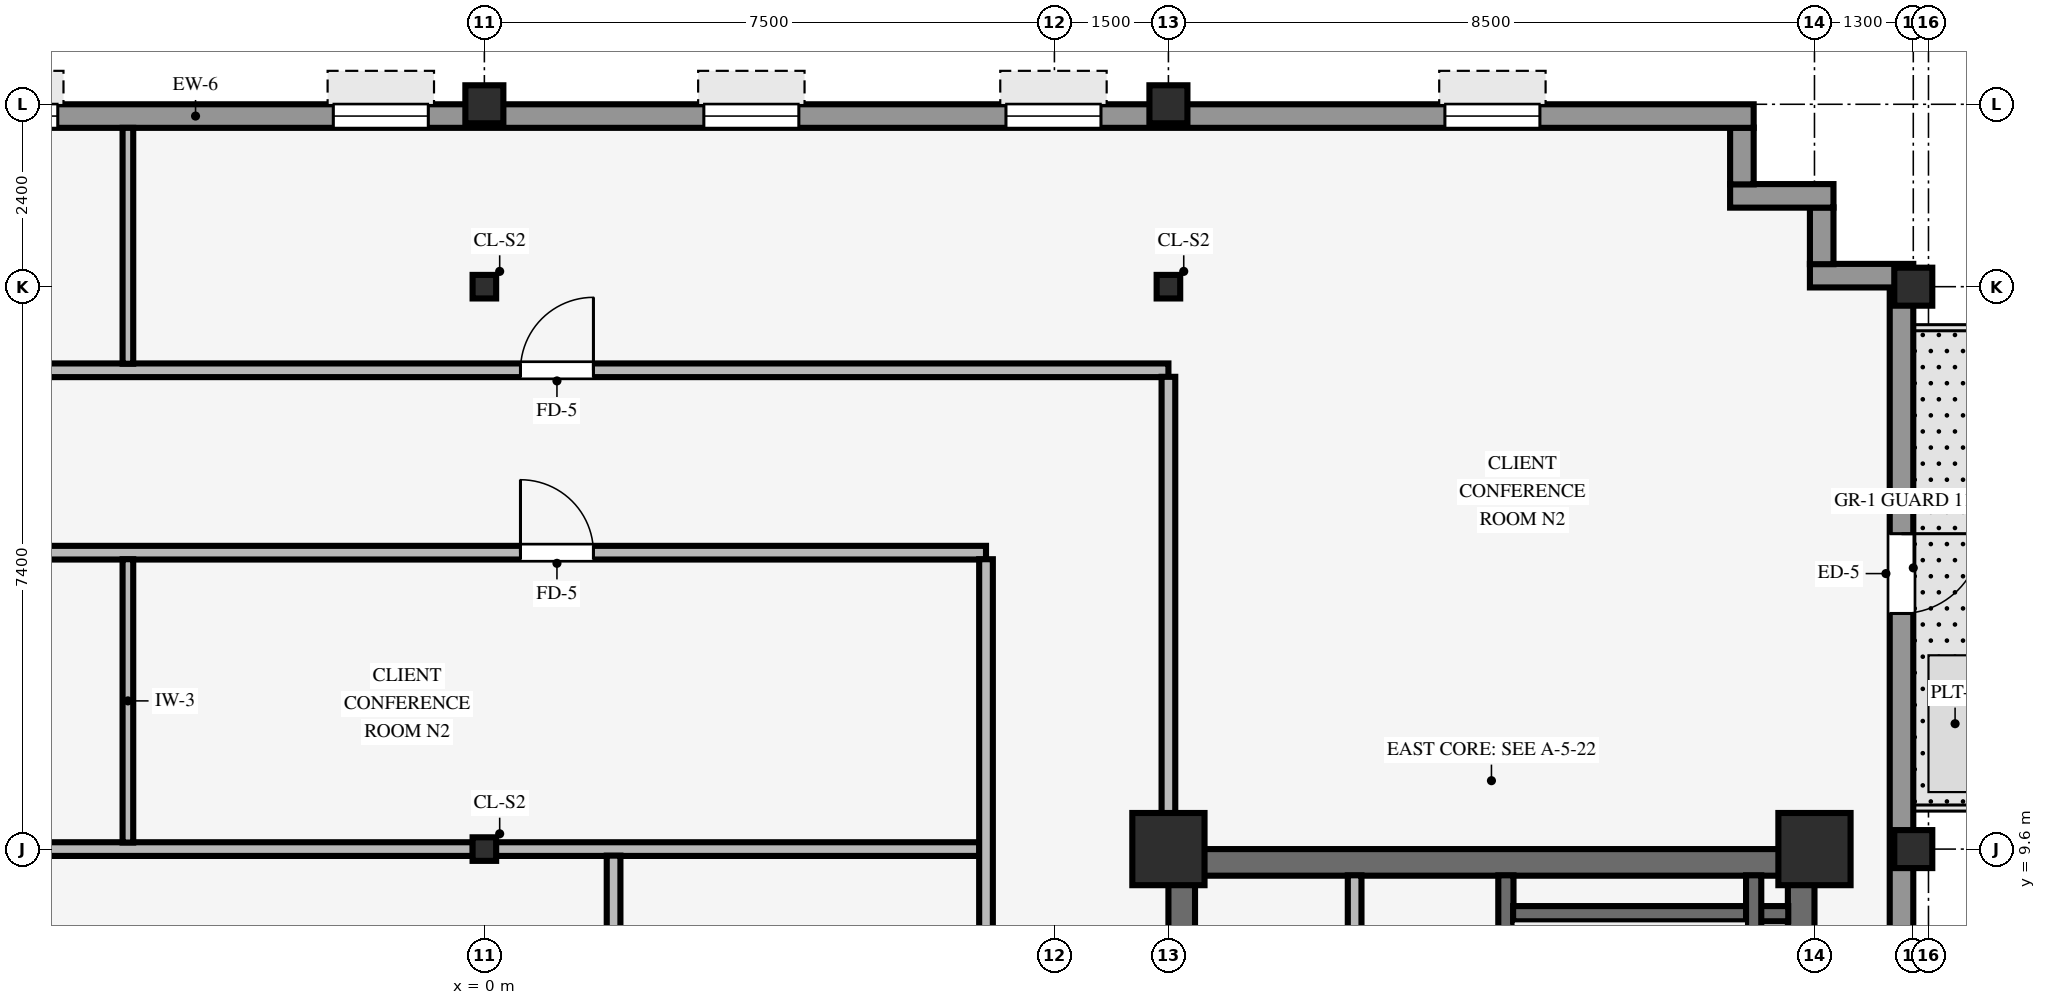
"""IFC4 building model, lengths in metres.
Left out: names, types, materials, properties, quantities, classifications, styles, units other than length and angle.
Written with IfcOpenShell. Run it as: python <this file> out.ifc"""

import sys

from ifc_helpers import new_model, si_unit, direction, frame, frame_2d, origin, origin_2d, place, context, subcontext, project, spatial, rectangle, hollow_rectangle, i_section, extrude, source, transform, mapped, element, fill, save


model = new_model("IFC4")
c1 = context("Model", 3, precision=1e-05, world=origin(), true_north=direction((0.0, 1.0)))
c2 = subcontext(c1, "Body", "Model", "MODEL_VIEW")
j1 = project(units=[si_unit("LENGTHUNIT", "METRE"), si_unit("PLANEANGLEUNIT", "RADIAN")], contexts=[c1])
p1 = place(None, origin())
s1 = spatial("IfcSite", under=j1, at=p1, CompositionType="ELEMENT")
p2 = place(p1, origin())
s2 = spatial("IfcBuilding", under=s1, at=p2, CompositionType="ELEMENT")
p3 = place(p2, frame((0.0, 0.0, 220.1)))
s3 = spatial("IfcBuildingStorey", under=s2, at=p3, CompositionType="ELEMENT", Elevation=220.1)
p4 = place(p3, frame((9.0, 9.425, 0.0), z_axis=(0.0, 0.0, 1.0), x_axis=(1.0, 0.0, 0.0)))
e1 = element("IfcWall", 1, at=p4, inside=s3, PredefinedType="SHEAR", context=c2, shape_type="SweptSolid", body=[
    extrude(rectangle(XDim=8.5, YDim=0.35, at=frame_2d((4.25, 0.0))), origin(), (0.0, 0.0, 1.0), 3.37),
])
p5 = place(p3, frame((9.175, -9.255, 0.0), z_axis=(0.0, 0.0, 1.0), x_axis=(0.0, 1.0, 0.0)))
e2 = element("IfcWall", 2, at=p5, inside=s3, PredefinedType="SHEAR", context=c2, shape_type="SweptSolid", body=[
    extrude(rectangle(XDim=18.51, YDim=0.35, at=frame_2d((9.255, 0.0))), origin(), (0.0, 0.0, 1.0), 3.37),
])
p6 = place(p5, frame((8.655, 0.0, 0.0)))
e3 = element("IfcOpeningElement", 3, at=p6, cuts=e2, PredefinedType="OPENING", context=c2, shape_type="SweptSolid", body=[
    extrude(rectangle(XDim=1.2, YDim=2.15, at=frame_2d((0.6, 1.075))), frame((0.0, 0.185, 0.0), z_axis=(0.0, -1.0, 0.0), x_axis=(1.0, 0.0, 0.0)), (0.0, 0.0, 1.0), 0.37),
])
p7 = place(p3, frame((17.325, -9.255, 0.0), z_axis=(0.0, 0.0, 1.0), x_axis=(0.0, 1.0, 0.0)))
e4 = element("IfcWall", 4, at=p7, inside=s3, PredefinedType="SHEAR", context=c2, shape_type="SweptSolid", body=[
    extrude(rectangle(XDim=18.51, YDim=0.35, at=frame_2d((9.255, 0.0))), origin(), (0.0, 0.0, 1.0), 3.37),
])
for number, where, z_axis, x_axis in (
    (5, (9.0, 9.6, 0.0), (0.0, 0.0, 1.0), (1.0, 0.0, 0.0)),
    (6, (17.5, 9.6, 0.0), (0.0, 0.0, 1.0), (1.0, 0.0, 0.0)),
):
    element("IfcColumn", number, at=place(p3, frame(where, z_axis=z_axis, x_axis=x_axis)), inside=s3, PredefinedType="COLUMN", context=c2, shape_type="SweptSolid", body=[
        extrude(rectangle(XDim=0.95, YDim=0.95, at=origin_2d()), origin(), (0.0, 0.0, 1.0), 3.37),
    ])
for number, where, z_axis, x_axis in (
    (7, (18.8, 9.6, 0.0), (0.0, 0.0, 1.0), (1.0, 0.0, 0.0)),
    (8, (18.8, 17.0, 0.0), (0.0, 0.0, 1.0), (1.0, 0.0, 0.0)),
    (9, (0.0, 19.4, 0.0), (0.0, 0.0, 1.0), (1.0, 0.0, 0.0)),
    (10, (9.0, 19.4, 0.0), (0.0, 0.0, 1.0), (1.0, 0.0, 0.0)),
):
    element("IfcColumn", number, at=place(p3, frame(where, z_axis=z_axis, x_axis=x_axis)), inside=s3, PredefinedType="COLUMN", context=c2, shape_type="SweptSolid", body=[
        extrude(hollow_rectangle(XDim=0.5, YDim=0.5, WallThickness=0.032, InnerFilletRadius=0.032, OuterFilletRadius=0.064, at=origin_2d()), origin(), (0.0, 0.0, 1.0), 3.37),
    ])
for number, where, z_axis, x_axis in (
    (11, (0.0, 9.6, 0.0), (0.0, 0.0, 1.0), (1.0, 0.0, 0.0)),
    (12, (0.0, 17.0, 0.0), (0.0, 0.0, 1.0), (1.0, 0.0, 0.0)),
    (13, (9.0, 17.0, 0.0), (0.0, 0.0, 1.0), (1.0, 0.0, 0.0)),
):
    element("IfcColumn", number, at=place(p3, frame(where, z_axis=z_axis, x_axis=x_axis)), inside=s3, PredefinedType="COLUMN", context=c2, shape_type="SweptSolid", body=[
        extrude(i_section(OverallWidth=0.31, OverallDepth=0.31, WebThickness=0.015, FlangeThickness=0.015, FilletRadius=0.015, at=origin_2d()), origin(), (0.0, 0.0, 1.0), 3.37),
    ])
p8 = place(p3, frame((18.645, -16.994, 0.0), z_axis=(0.0, 0.0, 1.0), x_axis=(0.0, 1.0, 0.0)))
e14 = element("IfcWall", 14, at=p8, inside=s3, PredefinedType="STANDARD", context=c2, shape_type="SweptSolid", body=[
    extrude(rectangle(XDim=33.988, YDim=0.31, at=frame_2d((16.994, 0.0))), origin(), (0.0, 0.0, 1.0), 2.705),
])
p9 = place(p8, frame((30.744, 0.0, 0.0), z_axis=(0.0, 0.0, 1.0), x_axis=(-1.0, 0.0, 0.0)))
e15 = element("IfcOpeningElement", 15, at=p9, cuts=e14, PredefinedType="OPENING", context=c2, shape_type="SweptSolid", body=[
    extrude(rectangle(XDim=1.05, YDim=2.1, at=frame_2d((0.525, 1.05))), frame((0.0, 0.165, 0.0), z_axis=(0.0, -1.0, 0.0), x_axis=(1.0, 0.0, 0.0)), (0.0, 0.0, 1.0), 0.33),
])
p10 = place(p8, frame((2.26, 0.0, 0.8)))
e16 = element("IfcOpeningElement", 16, at=p10, cuts=e14, PredefinedType="OPENING", context=c2, shape_type="SweptSolid", body=[
    extrude(rectangle(XDim=2.05, YDim=1.52, at=frame_2d((1.025, 0.76))), frame((0.0, 0.165, 0.0), z_axis=(0.0, -1.0, 0.0), x_axis=(1.0, 0.0, 0.0)), (0.0, 0.0, 1.0), 0.33),
])
p11 = place(p3, frame((17.44, 17.145, 0.0), z_axis=(0.0, 0.0, 1.0), x_axis=(1.0, 0.0, 0.0)))
e17 = element("IfcWall", 17, at=p11, inside=s3, PredefinedType="STANDARD", context=c2, shape_type="SweptSolid", body=[
    extrude(rectangle(XDim=1.36, YDim=0.31, at=frame_2d((0.68, 0.0))), origin(), (0.0, 0.0, 1.0), 2.816),
])
p12 = place(p3, frame((17.595, 17.296, 0.0), z_axis=(0.0, 0.0, 1.0), x_axis=(0.0, 1.0, 0.0)))
e18 = element("IfcWall", 18, at=p12, inside=s3, PredefinedType="STANDARD", context=c2, shape_type="SweptSolid", body=[
    extrude(rectangle(XDim=0.748, YDim=0.31, at=frame_2d((0.374, 0.0))), origin(), (0.0, 0.0, 1.0), 2.816),
])
p13 = place(p3, frame((16.39, 18.195, 0.0), z_axis=(0.0, 0.0, 1.0), x_axis=(1.0, 0.0, 0.0)))
e19 = element("IfcWall", 19, at=p13, inside=s3, PredefinedType="STANDARD", context=c2, shape_type="SweptSolid", body=[
    extrude(rectangle(XDim=1.36, YDim=0.31, at=frame_2d((0.68, 0.0))), origin(), (0.0, 0.0, 1.0), 2.816),
])
p14 = place(p3, frame((16.545, 18.346, 0.0), z_axis=(0.0, 0.0, 1.0), x_axis=(0.0, 1.0, 0.0)))
e20 = element("IfcWall", 20, at=p14, inside=s3, PredefinedType="STANDARD", context=c2, shape_type="SweptSolid", body=[
    extrude(rectangle(XDim=0.748, YDim=0.31, at=frame_2d((0.374, 0.0))), origin(), (0.0, 0.0, 1.0), 2.816),
])
p15 = place(p3, frame((-24.3, 19.245, 0.0), z_axis=(0.0, 0.0, 1.0), x_axis=(1.0, 0.0, 0.0)))
e21 = element("IfcWall", 21, at=p15, inside=s3, PredefinedType="STANDARD", context=c2, shape_type="SweptSolid", body=[
    extrude(rectangle(XDim=41.0, YDim=0.31, at=frame_2d((20.5, 0.0))), origin(), (0.0, 0.0, 1.0), 2.705),
])
p16 = place(p15, frame((2.812, 0.0, 0.8)))
e22 = element("IfcOpeningElement", 22, at=p16, cuts=e21, PredefinedType="OPENING", context=c2, shape_type="SweptSolid", body=[
    extrude(rectangle(XDim=1.25, YDim=1.52, at=frame_2d((0.625, 0.76))), frame((0.0, 0.165, 0.0), z_axis=(0.0, -1.0, 0.0), x_axis=(1.0, 0.0, 0.0)), (0.0, 0.0, 1.0), 0.33),
])
p17 = place(p15, frame((7.688, 0.0, 0.8)))
e23 = element("IfcOpeningElement", 23, at=p17, cuts=e21, PredefinedType="OPENING", context=c2, shape_type="SweptSolid", body=[
    extrude(rectangle(XDim=1.25, YDim=1.52, at=frame_2d((0.625, 0.76))), frame((0.0, 0.165, 0.0), z_axis=(0.0, -1.0, 0.0), x_axis=(1.0, 0.0, 0.0)), (0.0, 0.0, 1.0), 0.33),
])
p18 = place(p15, frame((12.562, 0.0, 0.8)))
e24 = element("IfcOpeningElement", 24, at=p18, cuts=e21, PredefinedType="OPENING", context=c2, shape_type="SweptSolid", body=[
    extrude(rectangle(XDim=1.25, YDim=1.52, at=frame_2d((0.625, 0.76))), frame((0.0, 0.165, 0.0), z_axis=(0.0, -1.0, 0.0), x_axis=(1.0, 0.0, 0.0)), (0.0, 0.0, 1.0), 0.33),
])
p19 = place(p15, frame((17.438, 0.0, 0.8)))
e25 = element("IfcOpeningElement", 25, at=p19, cuts=e21, PredefinedType="OPENING", context=c2, shape_type="SweptSolid", body=[
    extrude(rectangle(XDim=1.25, YDim=1.52, at=frame_2d((0.625, 0.76))), frame((0.0, 0.165, 0.0), z_axis=(0.0, -1.0, 0.0), x_axis=(1.0, 0.0, 0.0)), (0.0, 0.0, 1.0), 0.33),
])
p20 = place(p15, frame((22.312, 0.0, 0.8)))
e26 = element("IfcOpeningElement", 26, at=p20, cuts=e21, PredefinedType="OPENING", context=c2, shape_type="SweptSolid", body=[
    extrude(rectangle(XDim=1.25, YDim=1.52, at=frame_2d((0.625, 0.76))), frame((0.0, 0.165, 0.0), z_axis=(0.0, -1.0, 0.0), x_axis=(1.0, 0.0, 0.0)), (0.0, 0.0, 1.0), 0.33),
])
p21 = place(p15, frame((27.188, 0.0, 0.8)))
e27 = element("IfcOpeningElement", 27, at=p21, cuts=e21, PredefinedType="OPENING", context=c2, shape_type="SweptSolid", body=[
    extrude(rectangle(XDim=1.25, YDim=1.52, at=frame_2d((0.625, 0.76))), frame((0.0, 0.165, 0.0), z_axis=(0.0, -1.0, 0.0), x_axis=(1.0, 0.0, 0.0)), (0.0, 0.0, 1.0), 0.33),
])
p22 = place(p15, frame((31.163, 0.0, 0.8)))
e28 = element("IfcOpeningElement", 28, at=p22, cuts=e21, PredefinedType="OPENING", context=c2, shape_type="SweptSolid", body=[
    extrude(rectangle(XDim=1.25, YDim=1.52, at=frame_2d((0.625, 0.76))), frame((0.0, 0.165, 0.0), z_axis=(0.0, -1.0, 0.0), x_axis=(1.0, 0.0, 0.0)), (0.0, 0.0, 1.0), 0.33),
])
p23 = place(p15, frame((36.938, 0.0, 0.8)))
e29 = element("IfcOpeningElement", 29, at=p23, cuts=e21, PredefinedType="OPENING", context=c2, shape_type="SweptSolid", body=[
    extrude(rectangle(XDim=1.25, YDim=1.52, at=frame_2d((0.625, 0.76))), frame((0.0, 0.165, 0.0), z_axis=(0.0, -1.0, 0.0), x_axis=(1.0, 0.0, 0.0)), (0.0, 0.0, 1.0), 0.33),
])
p24 = place(p3, frame((13.44, 0.9, 0.0), z_axis=(0.0, 0.0, 1.0), x_axis=(0.0, 1.0, 0.0)))
e30 = element("IfcWall", 30, at=p24, inside=s3, PredefinedType="SHEAR", context=c2, shape_type="SweptSolid", body=[
    extrude(rectangle(XDim=8.355, YDim=0.2, at=frame_2d((4.177, 0.0))), origin(), (0.0, 0.0, 1.0), 3.37),
])
p25 = place(p24, frame((0.43, 0.0, 0.0)))
e31 = element("IfcOpeningElement", 31, at=p25, cuts=e30, PredefinedType="OPENING", context=c2, shape_type="SweptSolid", body=[
    extrude(rectangle(XDim=1.1, YDim=2.15, at=frame_2d((0.55, 1.075))), frame((0.0, 0.11, 0.0), z_axis=(0.0, -1.0, 0.0), x_axis=(1.0, 0.0, 0.0)), (0.0, 0.0, 1.0), 0.22),
])
p26 = place(p3, frame((13.535, 8.75, 0.0), z_axis=(0.0, 0.0, 1.0), x_axis=(1.0, 0.0, 0.0)))
e32 = element("IfcWall", 32, at=p26, inside=s3, PredefinedType="SHEAR", context=c2, shape_type="SweptSolid", body=[
    extrude(rectangle(XDim=3.62, YDim=0.2, at=frame_2d((1.81, 0.0))), origin(), (0.0, 0.0, 1.0), 3.37),
])
p27 = place(p3, frame((16.7, 1.095, 0.0), z_axis=(0.0, 0.0, 1.0), x_axis=(0.0, 1.0, 0.0)))
e33 = element("IfcWall", 33, at=p27, inside=s3, PredefinedType="SHEAR", context=c2, shape_type="SweptSolid", body=[
    extrude(rectangle(XDim=8.16, YDim=0.2, at=frame_2d((4.08, 0.0))), origin(), (0.0, 0.0, 1.0), 3.37),
])
p28 = place(p3, frame((11.45, 1.49, 0.0), z_axis=(0.0, 0.0, 1.0), x_axis=(0.0, 1.0, 0.0)))
e34 = element("IfcWall", 34, at=p28, inside=s3, PredefinedType="PARTITIONING", context=c2, shape_type="SweptSolid", body=[
    extrude(rectangle(XDim=7.765, YDim=0.18, at=frame_2d((3.882, 0.0))), origin(), (0.0, 0.0, 1.0), 3.36),
])
p29 = place(p3, frame((-8.529, 9.6, 0.0), z_axis=(0.0, 0.0, 1.0), x_axis=(1.0, 0.0, 0.0)))
e35 = element("IfcWall", 35, at=p29, inside=s3, PredefinedType="PARTITIONING", context=c2, shape_type="SweptSolid", body=[
    extrude(rectangle(XDim=8.378, YDim=0.18, at=frame_2d((4.189, 0.0))), origin(), (0.0, 0.0, 1.0), 2.405),
])
p30 = place(p3, frame((0.151, 9.6, 0.0), z_axis=(0.0, 0.0, 1.0), x_axis=(1.0, 0.0, 0.0)))
e36 = element("IfcWall", 36, at=p30, inside=s3, PredefinedType="PARTITIONING", context=c2, shape_type="SweptSolid", body=[
    extrude(rectangle(XDim=6.363, YDim=0.18, at=frame_2d((3.182, 0.0))), origin(), (0.0, 0.0, 1.0), 2.405),
])
p31 = place(p3, frame((-17.7, 13.5, 0.0), z_axis=(0.0, 0.0, 1.0), x_axis=(1.0, 0.0, 0.0)))
e37 = element("IfcWall", 37, at=p31, inside=s3, PredefinedType="PARTITIONING", context=c2, shape_type="SweptSolid", body=[
    extrude(rectangle(XDim=24.3, YDim=0.18, at=frame_2d((12.15, 0.0))), origin(), (0.0, 0.0, 1.0), 3.008),
])
p32 = place(p31, frame((6.025, 0.0, 0.0)))
e38 = element("IfcOpeningElement", 38, at=p32, cuts=e37, PredefinedType="OPENING", context=c2, shape_type="SweptSolid", body=[
    extrude(rectangle(XDim=0.96, YDim=2.1, at=frame_2d((0.48, 1.05))), frame((0.0, 0.1, 0.0), z_axis=(0.0, -1.0, 0.0), x_axis=(1.0, 0.0, 0.0)), (0.0, 0.0, 1.0), 0.2),
])
p33 = place(p31, frame((18.175, 0.0, 0.0)))
e39 = element("IfcOpeningElement", 39, at=p33, cuts=e37, PredefinedType="OPENING", context=c2, shape_type="SweptSolid", body=[
    extrude(rectangle(XDim=0.96, YDim=2.1, at=frame_2d((0.48, 1.05))), frame((0.0, 0.1, 0.0), z_axis=(0.0, -1.0, 0.0), x_axis=(1.0, 0.0, 0.0)), (0.0, 0.0, 1.0), 0.2),
])
p34 = place(p3, frame((-26.09, 15.9, 0.0), z_axis=(0.0, 0.0, 1.0), x_axis=(1.0, 0.0, 0.0)))
e40 = element("IfcWall", 40, at=p34, inside=s3, PredefinedType="PARTITIONING", context=c2, shape_type="SweptSolid", body=[
    extrude(rectangle(XDim=35.09, YDim=0.18, at=frame_2d((17.545, 0.0))), origin(), (0.0, 0.0, 1.0), 3.36),
])
p35 = place(p34, frame((14.415, 0.0, 0.0)))
e41 = element("IfcOpeningElement", 41, at=p35, cuts=e40, PredefinedType="OPENING", context=c2, shape_type="SweptSolid", body=[
    extrude(rectangle(XDim=0.96, YDim=2.1, at=frame_2d((0.48, 1.05))), frame((0.0, 0.1, 0.0), z_axis=(0.0, -1.0, 0.0), x_axis=(1.0, 0.0, 0.0)), (0.0, 0.0, 1.0), 0.2),
])
p36 = place(p34, frame((26.565, 0.0, 0.0)))
e42 = element("IfcOpeningElement", 42, at=p36, cuts=e40, PredefinedType="OPENING", context=c2, shape_type="SweptSolid", body=[
    extrude(rectangle(XDim=0.96, YDim=2.1, at=frame_2d((0.48, 1.05))), frame((0.0, 0.1, 0.0), z_axis=(0.0, -1.0, 0.0), x_axis=(1.0, 0.0, 0.0)), (0.0, 0.0, 1.0), 0.2),
])
p37 = place(p3, frame((-4.69, 9.686, 0.0), z_axis=(0.0, 0.0, 1.0), x_axis=(0.0, 1.0, 0.0)))
e43 = element("IfcWall", 43, at=p37, inside=s3, PredefinedType="PARTITIONING", context=c2, shape_type="SweptSolid", body=[
    extrude(rectangle(XDim=3.728, YDim=0.14, at=frame_2d((1.864, 0.0))), origin(), (0.0, 0.0, 1.0), 3.36),
])
p38 = place(p3, frame((-4.69, 15.986, 0.0), z_axis=(0.0, 0.0, 1.0), x_axis=(0.0, 1.0, 0.0)))
e44 = element("IfcWall", 44, at=p38, inside=s3, PredefinedType="PARTITIONING", context=c2, shape_type="SweptSolid", body=[
    extrude(rectangle(XDim=3.104, YDim=0.14, at=frame_2d((1.552, 0.0))), origin(), (0.0, 0.0, 1.0), 3.36),
])
p39 = place(p3, frame((1.7, 1.336, 0.0), z_axis=(0.0, 0.0, 1.0), x_axis=(0.0, 1.0, 0.0)))
e45 = element("IfcWall", 45, at=p39, inside=s3, PredefinedType="PARTITIONING", context=c2, shape_type="SweptSolid", body=[
    extrude(rectangle(XDim=8.178, YDim=0.18, at=frame_2d((4.089, 0.0))), origin(), (0.0, 0.0, 1.0), 3.36),
])
p40 = place(p3, frame((6.6, 1.336, 0.0), z_axis=(0.0, 0.0, 1.0), x_axis=(0.0, 1.0, 0.0)))
e46 = element("IfcWall", 46, at=p40, inside=s3, PredefinedType="PARTITIONING", context=c2, shape_type="SweptSolid", body=[
    extrude(rectangle(XDim=12.078, YDim=0.18, at=frame_2d((6.039, 0.0))), origin(), (0.0, 0.0, 1.0), 3.36),
])
p41 = place(p40, frame((3.652, 0.0, 0.0)))
e47 = element("IfcOpeningElement", 47, at=p41, cuts=e46, PredefinedType="OPENING", context=c2, shape_type="SweptSolid", body=[
    extrude(rectangle(XDim=0.96, YDim=2.1, at=frame_2d((0.48, 1.05))), frame((0.0, 0.1, 0.0), z_axis=(0.0, -1.0, 0.0), x_axis=(1.0, 0.0, 0.0)), (0.0, 0.0, 1.0), 0.2),
])
p42 = place(p3, frame((9.0, 10.071, 0.0), z_axis=(0.0, 0.0, 1.0), x_axis=(0.0, 1.0, 0.0)))
e48 = element("IfcWall", 48, at=p42, inside=s3, PredefinedType="PARTITIONING", context=c2, shape_type="SweptSolid", body=[
    extrude(rectangle(XDim=5.743, YDim=0.18, at=frame_2d((2.872, 0.0))), origin(), (0.0, 0.0, 1.0), 2.816),
])
m1 = source(origin(), c2, "Body", "SweptSolid", [
    extrude(rectangle(XDim=1.05, YDim=2.1, at=frame_2d((0.525, 1.05))), frame((0.0, 0.025, 0.0), z_axis=(0.0, -1.0, 0.0), x_axis=(1.0, 0.0, 0.0)), (0.0, 0.0, 1.0), 0.05),
])
p43 = place(p9, origin())
e49 = element("IfcDoor", 49, at=p43, inside=s3, OperationType="SINGLE_SWING_LEFT", PredefinedType="DOOR", context=c2, shape_type="MappedRepresentation", body=[
    mapped(m1, transform((0.0, 0.0, 0.0), scale=1.0)),
])
fill(e15, e49)
m2 = source(origin(), c2, "Body", "SweptSolid", [
    extrude(rectangle(XDim=1.25, YDim=1.52, at=frame_2d((0.625, 0.76))), frame((0.0, 0.03, 0.0), z_axis=(0.0, -1.0, 0.0), x_axis=(1.0, 0.0, 0.0)), (0.0, 0.0, 1.0), 0.06),
])
p44 = place(p19, origin())
e50 = element("IfcWindow", 50, at=p44, inside=s3, PartitioningType="SINGLE_PANEL", PredefinedType="WINDOW", context=c2, shape_type="MappedRepresentation", body=[
    mapped(m2, transform((0.0, 0.0, 0.0), scale=1.0)),
])
fill(e25, e50)
p45 = place(p20, origin())
e51 = element("IfcWindow", 51, at=p45, inside=s3, PartitioningType="SINGLE_PANEL", PredefinedType="WINDOW", context=c2, shape_type="MappedRepresentation", body=[
    mapped(m2, transform((0.0, 0.0, 0.0), scale=1.0)),
])
fill(e26, e51)
p46 = place(p21, origin())
e52 = element("IfcWindow", 52, at=p46, inside=s3, PartitioningType="SINGLE_PANEL", PredefinedType="WINDOW", context=c2, shape_type="MappedRepresentation", body=[
    mapped(m2, transform((0.0, 0.0, 0.0), scale=1.0)),
])
fill(e27, e52)
p47 = place(p22, origin())
e53 = element("IfcWindow", 53, at=p47, inside=s3, PartitioningType="SINGLE_PANEL", PredefinedType="WINDOW", context=c2, shape_type="MappedRepresentation", body=[
    mapped(m2, transform((0.0, 0.0, 0.0), scale=1.0)),
])
fill(e28, e53)
p48 = place(p23, origin())
e54 = element("IfcWindow", 54, at=p48, inside=s3, PartitioningType="SINGLE_PANEL", PredefinedType="WINDOW", context=c2, shape_type="MappedRepresentation", body=[
    mapped(m2, transform((0.0, 0.0, 0.0), scale=1.0)),
])
fill(e29, e54)
m3 = source(origin(), c2, "Body", "SweptSolid", [
    extrude(rectangle(XDim=0.96, YDim=2.1, at=frame_2d((0.48, 1.05))), frame((0.0, 0.025, 0.0), z_axis=(0.0, -1.0, 0.0), x_axis=(1.0, 0.0, 0.0)), (0.0, 0.0, 1.0), 0.05),
])
p49 = place(p36, origin())
e55 = element("IfcDoor", 55, at=p49, inside=s3, OperationType="SINGLE_SWING_RIGHT", PredefinedType="DOOR", context=c2, shape_type="MappedRepresentation", body=[
    mapped(m3, transform((0.0, 0.0, 0.0), scale=1.0)),
])
fill(e42, e55)
p50 = place(p33, origin())
e56 = element("IfcDoor", 56, at=p50, inside=s3, OperationType="SINGLE_SWING_LEFT", PredefinedType="DOOR", context=c2, shape_type="MappedRepresentation", body=[
    mapped(m3, transform((0.0, 0.0, 0.0), scale=1.0)),
])
fill(e39, e56)
save(model, sys.argv[1])
